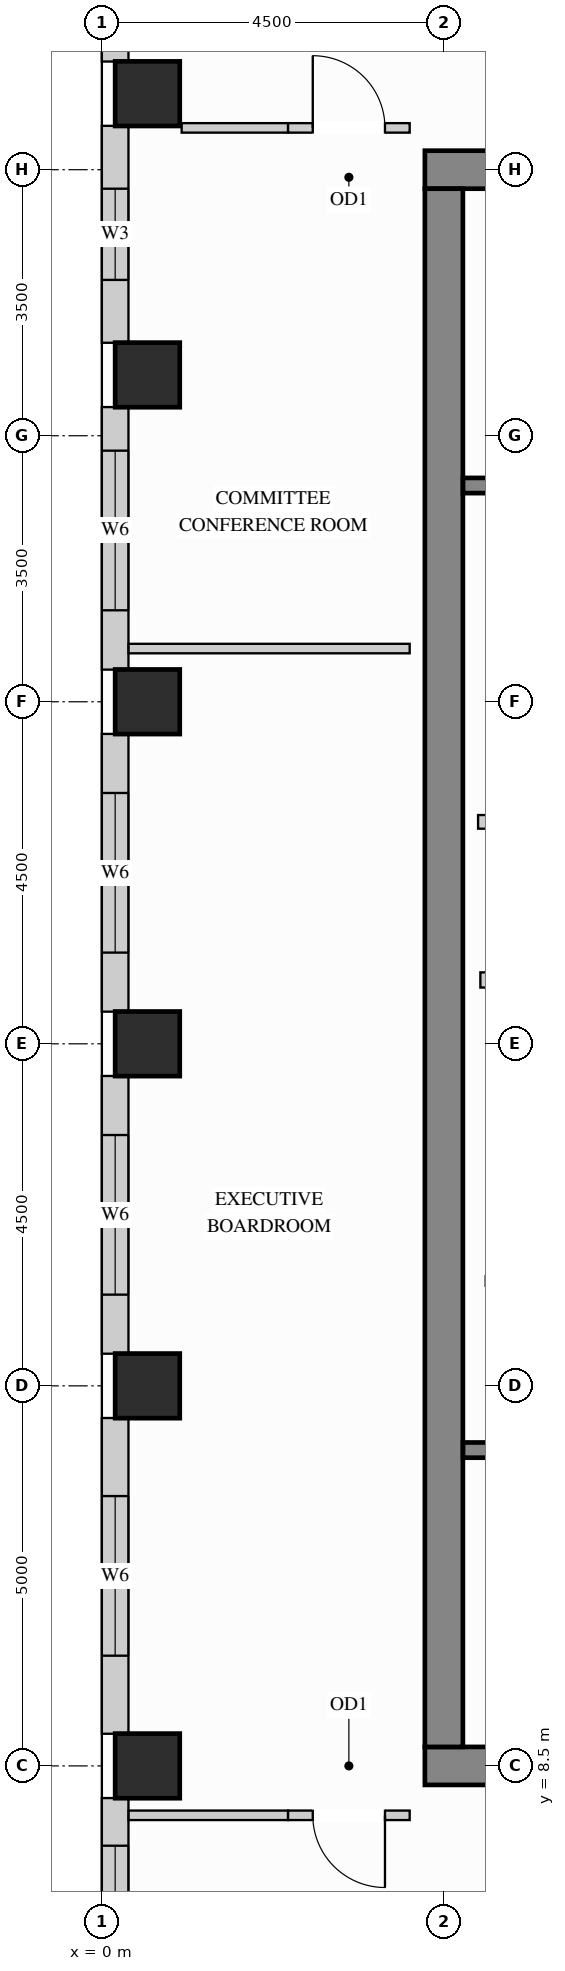
"""IFC4 building model, lengths in metres.
Left out: names, types, materials, properties, quantities, classifications, styles, units other than length and angle.
Written with IfcOpenShell. Run it as: python <this file> out.ifc"""

import sys

from ifc_helpers import new_model, si_unit, direction, frame, frame_2d, origin, origin_2d, place, context, subcontext, project, spatial, rectangle, extrude, source, transform, mapped, element, fill, save


model = new_model("IFC4")
c1 = context("Model", 3, precision=1e-05, world=origin(), true_north=direction((0.0, 1.0)))
c2 = subcontext(c1, "Body", "Model", "MODEL_VIEW")
j1 = project(units=[si_unit("LENGTHUNIT", "METRE"), si_unit("PLANEANGLEUNIT", "RADIAN")], contexts=[c1])
p1 = place(None, origin())
s1 = spatial("IfcSite", under=j1, at=p1, CompositionType="ELEMENT")
p2 = place(p1, origin())
s2 = spatial("IfcBuilding", under=s1, at=p2, CompositionType="ELEMENT")
p3 = place(p2, frame((0.0, 0.0, 244.8)))
s3 = spatial("IfcBuildingStorey", under=s2, at=p3, CompositionType="ELEMENT", Elevation=244.8)
m1 = source(origin(), c2, "Body", "SweptSolid", [
    extrude(rectangle(XDim=0.85, YDim=0.85, at=origin_2d()), origin(), (0.0, 0.0, 1.0), 3.4),
])
for number, where, z_axis, x_axis in (
    (1, (0.6, 13.5, 0.0), (0.0, 0.0, 1.0), (1.0, 0.0, 0.0)),
    (2, (0.6, 18.0, 0.0), (0.0, 0.0, 1.0), (1.0, 0.0, 0.0)),
    (3, (0.6, 22.5, 0.0), (0.0, 0.0, 1.0), (1.0, 0.0, 0.0)),
    (4, (0.6, 26.8, 0.0), (0.0, 0.0, 1.0), (1.0, 0.0, 0.0)),
    (5, (0.6, 30.5, 0.0), (0.0, 0.0, 1.0), (1.0, 0.0, 0.0)),
    (6, (0.6, 8.5, 0.0), (0.0, 0.0, 1.0), (1.0, 0.0, 0.0)),
):
    element("IfcColumn", number, at=place(p3, frame(where, z_axis=z_axis, x_axis=x_axis)), inside=s3, PredefinedType="COLUMN", context=c2, shape_type="MappedRepresentation", body=[
        mapped(m1, transform((0.0, 0.0, 0.0), x_axis=(1.0, 0.0, 0.0), y_axis=(0.0, 1.0, 0.0), z_axis=(0.0, 0.0, 1.0))),
    ])
m2 = source(origin(), c2, "Body", "SweptSolid", [
    extrude(rectangle(XDim=10.5, YDim=0.5, at=frame_2d((5.25, 0.0))), origin(), (0.0, 0.0, 1.0), 3.4),
])
for number, where, z_axis, x_axis in (
    (7, (4.25, 29.5, 0.0), (0.0, 0.0, 1.0), (1.0, 0.0, 0.0)),
    (8, (4.25, 8.5, 0.0), (0.0, 0.0, 1.0), (1.0, 0.0, 0.0)),
):
    element("IfcWall", number, at=place(p3, frame(where, z_axis=z_axis, x_axis=x_axis)), inside=s3, PredefinedType="SHEAR", context=c2, shape_type="MappedRepresentation", body=[
        mapped(m2, transform((0.0, 0.0, 0.0), x_axis=(1.0, 0.0, 0.0), y_axis=(0.0, 1.0, 0.0), z_axis=(0.0, 0.0, 1.0))),
    ])
m3 = source(origin(), c2, "Body", "SweptSolid", [
    extrude(rectangle(XDim=20.5, YDim=0.5, at=frame_2d((10.25, 0.0))), origin(), (0.0, 0.0, 1.0), 3.4),
])
p4 = place(p3, frame((4.5, 8.75, 0.0), z_axis=(0.0, 0.0, 1.0), x_axis=(0.0, 1.0, 0.0)))
e9 = element("IfcWall", 9, at=p4, inside=s3, PredefinedType="SHEAR", context=c2, shape_type="MappedRepresentation", body=[
    mapped(m3, transform((0.0, 0.0, 0.0), x_axis=(1.0, 0.0, 0.0), y_axis=(0.0, 1.0, 0.0), z_axis=(0.0, 0.0, 1.0))),
])
m4 = source(origin(), c2, "Body", "SweptSolid", [
    extrude(rectangle(XDim=0.527, YDim=0.35, at=frame_2d((0.263, 0.0))), origin(), (0.0, 0.0, 1.0), 3.385),
])
p5 = place(p3, frame((0.175, 31.45, 0.0), z_axis=(0.0, 0.0, 1.0), x_axis=(0.0, -1.0, 0.0)))
e10 = element("IfcWall", 10, at=p5, inside=s3, PredefinedType="SOLIDWALL", context=c2, shape_type="MappedRepresentation", body=[
    mapped(m4, transform((0.0, 0.0, 0.0), x_axis=(1.0, 0.0, 0.0), y_axis=(0.0, 1.0, 0.0), z_axis=(0.0, 0.0, 1.0))),
])
p6 = place(p3, frame((0.175, 30.077, 0.0), z_axis=(0.0, 0.0, 1.0), x_axis=(0.0, -1.0, 0.0)))
e11 = element("IfcWall", 11, at=p6, inside=s3, PredefinedType="SOLIDWALL", context=c2, shape_type="SweptSolid", body=[
    extrude(rectangle(XDim=2.854, YDim=0.35, at=frame_2d((1.427, 0.0))), origin(), (0.0, 0.0, 1.0), 3.385),
])
p7 = place(p6, frame((0.827, 0.0, 0.78)))
e12 = element("IfcOpeningElement", 12, at=p7, cuts=e11, PredefinedType="OPENING", context=c2, shape_type="SweptSolid", body=[
    extrude(rectangle(XDim=1.2, YDim=2.25, at=frame_2d((0.6, 1.125))), frame((0.0, 0.185, 0.0), z_axis=(0.0, -1.0, 0.0), x_axis=(1.0, 0.0, 0.0)), (0.0, 0.0, 1.0), 0.37),
])
p8 = place(p3, frame((0.175, 26.377, 0.0), z_axis=(0.0, 0.0, 1.0), x_axis=(0.0, -1.0, 0.0)))
e13 = element("IfcWall", 13, at=p8, inside=s3, PredefinedType="SOLIDWALL", context=c2, shape_type="SweptSolid", body=[
    extrude(rectangle(XDim=3.454, YDim=0.35, at=frame_2d((1.727, 0.0))), origin(), (0.0, 0.0, 1.0), 3.385),
])
p9 = place(p8, frame((0.573, 0.0, 0.78)))
e14 = element("IfcOpeningElement", 14, at=p9, cuts=e13, PredefinedType="OPENING", context=c2, shape_type="SweptSolid", body=[
    extrude(rectangle(XDim=2.1, YDim=2.25, at=frame_2d((1.05, 1.125))), frame((0.0, 0.185, 0.0), z_axis=(0.0, -1.0, 0.0), x_axis=(1.0, 0.0, 0.0)), (0.0, 0.0, 1.0), 0.37),
])
p10 = place(p3, frame((0.175, 22.077, 0.0), z_axis=(0.0, 0.0, 1.0), x_axis=(0.0, -1.0, 0.0)))
e15 = element("IfcWall", 15, at=p10, inside=s3, PredefinedType="SOLIDWALL", context=c2, shape_type="SweptSolid", body=[
    extrude(rectangle(XDim=3.654, YDim=0.35, at=frame_2d((1.827, 0.0))), origin(), (0.0, 0.0, 1.0), 3.385),
])
p11 = place(p10, frame((0.777, 0.0, 0.78)))
e16 = element("IfcOpeningElement", 16, at=p11, cuts=e15, PredefinedType="OPENING", context=c2, shape_type="SweptSolid", body=[
    extrude(rectangle(XDim=2.1, YDim=2.25, at=frame_2d((1.05, 1.125))), frame((0.0, 0.185, 0.0), z_axis=(0.0, -1.0, 0.0), x_axis=(1.0, 0.0, 0.0)), (0.0, 0.0, 1.0), 0.37),
])
p12 = place(p3, frame((0.175, 17.577, 0.0), z_axis=(0.0, 0.0, 1.0), x_axis=(0.0, -1.0, 0.0)))
e17 = element("IfcWall", 17, at=p12, inside=s3, PredefinedType="SOLIDWALL", context=c2, shape_type="SweptSolid", body=[
    extrude(rectangle(XDim=3.654, YDim=0.35, at=frame_2d((1.827, 0.0))), origin(), (0.0, 0.0, 1.0), 3.385),
])
p13 = place(p12, frame((0.777, 0.0, 0.78)))
e18 = element("IfcOpeningElement", 18, at=p13, cuts=e17, PredefinedType="OPENING", context=c2, shape_type="SweptSolid", body=[
    extrude(rectangle(XDim=2.1, YDim=2.25, at=frame_2d((1.05, 1.125))), frame((0.0, 0.185, 0.0), z_axis=(0.0, -1.0, 0.0), x_axis=(1.0, 0.0, 0.0)), (0.0, 0.0, 1.0), 0.37),
])
p14 = place(p3, frame((0.175, 13.077, 0.0), z_axis=(0.0, 0.0, 1.0), x_axis=(0.0, -1.0, 0.0)))
e19 = element("IfcWall", 19, at=p14, inside=s3, PredefinedType="SOLIDWALL", context=c2, shape_type="SweptSolid", body=[
    extrude(rectangle(XDim=4.154, YDim=0.35, at=frame_2d((2.077, 0.0))), origin(), (0.0, 0.0, 1.0), 3.385),
])
p15 = place(p14, frame((1.027, 0.0, 0.78)))
e20 = element("IfcOpeningElement", 20, at=p15, cuts=e19, PredefinedType="OPENING", context=c2, shape_type="SweptSolid", body=[
    extrude(rectangle(XDim=2.1, YDim=2.25, at=frame_2d((1.05, 1.125))), frame((0.0, 0.185, 0.0), z_axis=(0.0, -1.0, 0.0), x_axis=(1.0, 0.0, 0.0)), (0.0, 0.0, 1.0), 0.37),
])
p16 = place(p3, frame((0.175, 8.077, 0.0), z_axis=(0.0, 0.0, 1.0), x_axis=(0.0, -1.0, 0.0)))
e21 = element("IfcWall", 21, at=p16, inside=s3, PredefinedType="SOLIDWALL", context=c2, shape_type="SweptSolid", body=[
    extrude(rectangle(XDim=4.154, YDim=0.35, at=frame_2d((2.077, 0.0))), origin(), (0.0, 0.0, 1.0), 3.385),
])
p17 = place(p16, frame((0.627, 0.0, 0.78)))
e22 = element("IfcOpeningElement", 22, at=p17, cuts=e21, PredefinedType="OPENING", context=c2, shape_type="SweptSolid", body=[
    extrude(rectangle(XDim=2.1, YDim=2.25, at=frame_2d((1.05, 1.125))), frame((0.0, 0.185, 0.0), z_axis=(0.0, -1.0, 0.0), x_axis=(1.0, 0.0, 0.0)), (0.0, 0.0, 1.0), 0.37),
])
m5 = source(origin(), c2, "Body", "SweptSolid", [
    extrude(rectangle(XDim=2.2, YDim=0.18, at=frame_2d((1.1, 0.0))), origin(), (0.0, 0.0, 1.0), 3.385),
])
p18 = place(p3, frame((4.95, 20.92, 0.0), z_axis=(0.0, 0.0, 1.0), x_axis=(1.0, 0.0, 0.0)))
e23 = element("IfcWall", 23, at=p18, inside=s3, PredefinedType="PARTITIONING", context=c2, shape_type="MappedRepresentation", body=[
    mapped(m5, transform((0.0, 0.0, 0.0), x_axis=(1.0, 0.0, 0.0), y_axis=(0.0, 1.0, 0.0), z_axis=(0.0, 0.0, 1.0))),
])
p19 = place(p3, frame((5.05, 14.88, 0.0), z_axis=(0.0, 0.0, 1.0), x_axis=(1.0, 0.0, 0.0)))
e24 = element("IfcWall", 24, at=p19, inside=s3, PredefinedType="PARTITIONING", context=c2, shape_type="SweptSolid", body=[
    extrude(rectangle(XDim=2.35, YDim=0.125, at=frame_2d((1.175, 0.0))), origin(), (0.0, 0.0, 1.0), 3.385),
])
p20 = place(p19, frame((0.7, 0.0, 0.0)))
e25 = element("IfcOpeningElement", 25, at=p20, cuts=e24, PredefinedType="OPENING", context=c2, shape_type="SweptSolid", body=[
    extrude(rectangle(XDim=0.85, YDim=2.1, at=frame_2d((0.425, 1.05))), frame((0.0, 0.073, 0.0), z_axis=(0.0, -1.0, 0.0), x_axis=(1.0, 0.0, 0.0)), (0.0, 0.0, 1.0), 0.145),
])
m6 = source(origin(), c2, "Body", "SweptSolid", [
    extrude(rectangle(XDim=1.4, YDim=0.125, at=frame_2d((0.7, 0.0))), origin(), (0.0, 0.0, 1.0), 3.385),
])
p21 = place(p3, frame((1.05, 30.05, 0.0), z_axis=(0.0, 0.0, 1.0), x_axis=(1.0, 0.0, 0.0)))
e26 = element("IfcWall", 26, at=p21, inside=s3, PredefinedType="PARTITIONING", context=c2, shape_type="MappedRepresentation", body=[
    mapped(m6, transform((0.0, 0.0, 0.0), x_axis=(1.0, 0.0, 0.0), y_axis=(0.0, 1.0, 0.0), z_axis=(0.0, 0.0, 1.0))),
])
p22 = place(p3, frame((2.45, 30.05, 0.0), z_axis=(0.0, 0.0, 1.0), x_axis=(1.0, 0.0, 0.0)))
e27 = element("IfcWall", 27, at=p22, inside=s3, PredefinedType="PARTITIONING", context=c2, shape_type="SweptSolid", body=[
    extrude(rectangle(XDim=1.6, YDim=0.125, at=frame_2d((0.8, 0.0))), origin(), (0.0, 0.0, 1.0), 3.385),
])
p23 = place(p22, frame((0.325, 0.0, 0.0)))
e28 = element("IfcOpeningElement", 28, at=p23, cuts=e27, PredefinedType="OPENING", context=c2, shape_type="SweptSolid", body=[
    extrude(rectangle(XDim=0.95, YDim=2.15, at=frame_2d((0.475, 1.075))), frame((0.0, 0.073, 0.0), z_axis=(0.0, -1.0, 0.0), x_axis=(1.0, 0.0, 0.0)), (0.0, 0.0, 1.0), 0.145),
])
m7 = source(origin(), c2, "Body", "SweptSolid", [
    extrude(rectangle(XDim=2.098, YDim=0.125, at=frame_2d((1.049, 0.0))), origin(), (0.0, 0.0, 1.0), 3.385),
])
p24 = place(p3, frame((0.352, 7.85, 0.0), z_axis=(0.0, 0.0, 1.0), x_axis=(1.0, 0.0, 0.0)))
e29 = element("IfcWall", 29, at=p24, inside=s3, PredefinedType="PARTITIONING", context=c2, shape_type="MappedRepresentation", body=[
    mapped(m7, transform((0.0, 0.0, 0.0), x_axis=(1.0, 0.0, 0.0), y_axis=(0.0, 1.0, 0.0), z_axis=(0.0, 0.0, 1.0))),
])
p25 = place(p3, frame((2.45, 7.85, 0.0), z_axis=(0.0, 0.0, 1.0), x_axis=(1.0, 0.0, 0.0)))
e30 = element("IfcWall", 30, at=p25, inside=s3, PredefinedType="PARTITIONING", context=c2, shape_type="SweptSolid", body=[
    extrude(rectangle(XDim=1.6, YDim=0.125, at=frame_2d((0.8, 0.0))), origin(), (0.0, 0.0, 1.0), 3.385),
])
p26 = place(p25, frame((0.325, 0.0, 0.0)))
e31 = element("IfcOpeningElement", 31, at=p26, cuts=e30, PredefinedType="OPENING", context=c2, shape_type="SweptSolid", body=[
    extrude(rectangle(XDim=0.95, YDim=2.15, at=frame_2d((0.475, 1.075))), frame((0.0, 0.073, 0.0), z_axis=(0.0, -1.0, 0.0), x_axis=(1.0, 0.0, 0.0)), (0.0, 0.0, 1.0), 0.145),
])
m8 = source(origin(), c2, "Body", "SweptSolid", [
    extrude(rectangle(XDim=3.698, YDim=0.125, at=frame_2d((1.849, 0.0))), origin(), (0.0, 0.0, 1.0), 3.385),
])
p27 = place(p3, frame((0.352, 23.2, 0.0), z_axis=(0.0, 0.0, 1.0), x_axis=(1.0, 0.0, 0.0)))
e32 = element("IfcWall", 32, at=p27, inside=s3, PredefinedType="PARTITIONING", context=c2, shape_type="MappedRepresentation", body=[
    mapped(m8, transform((0.0, 0.0, 0.0), x_axis=(1.0, 0.0, 0.0), y_axis=(0.0, 1.0, 0.0), z_axis=(0.0, 0.0, 1.0))),
])
m9 = source(origin(), c2, "Body", "SweptSolid", [
    extrude(rectangle(XDim=2.09, YDim=0.2, at=frame_2d((1.045, 0.0))), origin(), (0.0, 0.0, 1.0), 3.385),
])
p28 = place(p3, frame((4.98, 18.84, 0.0), z_axis=(0.0, 0.0, 1.0), x_axis=(1.0, 0.0, 0.0)))
e33 = element("IfcWall", 33, at=p28, inside=s3, PredefinedType="PARTITIONING", context=c2, shape_type="MappedRepresentation", body=[
    mapped(m9, transform((0.0, 0.0, 0.0), x_axis=(1.0, 0.0, 0.0), y_axis=(0.0, 1.0, 0.0), z_axis=(0.0, 0.0, 1.0))),
])
p29 = place(p3, frame((4.752, 12.655, 0.0), z_axis=(0.0, 0.0, 1.0), x_axis=(1.0, 0.0, 0.0)))
e34 = element("IfcWall", 34, at=p29, inside=s3, PredefinedType="SHEAR", context=c2, shape_type="SweptSolid", body=[
    extrude(rectangle(XDim=7.653, YDim=0.2, at=frame_2d((3.827, 0.0))), origin(), (0.0, 0.0, 1.0), 3.4),
])
p30 = place(p29, frame((0.4, 0.0, 0.0)))
e35 = element("IfcOpeningElement", 35, at=p30, cuts=e34, PredefinedType="OPENING", context=c2, shape_type="SweptSolid", body=[
    extrude(rectangle(XDim=1.1, YDim=2.15, at=frame_2d((0.55, 1.075))), frame((0.0, 0.11, 0.0), z_axis=(0.0, -1.0, 0.0), x_axis=(1.0, 0.0, 0.0)), (0.0, 0.0, 1.0), 0.22),
])
p31 = place(p3, frame((4.752, 25.345, 0.0), z_axis=(0.0, 0.0, 1.0), x_axis=(1.0, 0.0, 0.0)))
e36 = element("IfcWall", 36, at=p31, inside=s3, PredefinedType="SHEAR", context=c2, shape_type="SweptSolid", body=[
    extrude(rectangle(XDim=7.653, YDim=0.2, at=frame_2d((3.827, 0.0))), origin(), (0.0, 0.0, 1.0), 3.4),
])
p32 = place(p31, frame((0.4, 0.0, 0.0)))
e37 = element("IfcOpeningElement", 37, at=p32, cuts=e36, PredefinedType="OPENING", context=c2, shape_type="SweptSolid", body=[
    extrude(rectangle(XDim=1.1, YDim=2.15, at=frame_2d((0.55, 1.075))), frame((0.0, 0.11, 0.0), z_axis=(0.0, -1.0, 0.0), x_axis=(1.0, 0.0, 0.0)), (0.0, 0.0, 1.0), 0.22),
])
m10 = source(origin(), c2, "Body", "SweptSolid", [
    extrude(rectangle(XDim=0.95, YDim=2.15, at=frame_2d((0.475, 1.075))), frame((0.0, 0.025, 0.0), z_axis=(0.0, -1.0, 0.0), x_axis=(1.0, 0.0, 0.0)), (0.0, 0.0, 1.0), 0.05),
])
p33 = place(p26, origin())
e38 = element("IfcDoor", 38, at=p33, inside=s3, OperationType="SINGLE_SWING_RIGHT", PredefinedType="DOOR", context=c2, shape_type="MappedRepresentation", body=[
    mapped(m10, transform((0.0, 0.0, 0.0), x_axis=(1.0, 0.0, 0.0), y_axis=(0.0, 1.0, 0.0), z_axis=(0.0, 0.0, 1.0))),
])
fill(e31, e38)
p34 = place(p23, origin())
e39 = element("IfcDoor", 39, at=p34, inside=s3, OperationType="SINGLE_SWING_LEFT", PredefinedType="DOOR", context=c2, shape_type="MappedRepresentation", body=[
    mapped(m10, transform((0.0, 0.0, 0.0), x_axis=(1.0, 0.0, 0.0), y_axis=(0.0, 1.0, 0.0), z_axis=(0.0, 0.0, 1.0))),
])
fill(e28, e39)
m11 = source(origin(), c2, "Body", "SweptSolid", [
    extrude(rectangle(XDim=1.2, YDim=2.25, at=frame_2d((0.6, 1.125))), frame((0.0, 0.03, 0.0), z_axis=(0.0, -1.0, 0.0), x_axis=(1.0, 0.0, 0.0)), (0.0, 0.0, 1.0), 0.06),
])
p35 = place(p7, origin())
e40 = element("IfcWindow", 40, at=p35, inside=s3, PartitioningType="SINGLE_PANEL", PredefinedType="WINDOW", context=c2, shape_type="MappedRepresentation", body=[
    mapped(m11, transform((0.0, 0.0, 0.0), x_axis=(1.0, 0.0, 0.0), y_axis=(0.0, 1.0, 0.0), z_axis=(0.0, 0.0, 1.0))),
])
fill(e12, e40)
m12 = source(origin(), c2, "Body", "SweptSolid", [
    extrude(rectangle(XDim=2.1, YDim=2.25, at=frame_2d((1.05, 1.125))), frame((0.0, 0.03, 0.0), z_axis=(0.0, -1.0, 0.0), x_axis=(1.0, 0.0, 0.0)), (0.0, 0.0, 1.0), 0.06),
])
p36 = place(p9, origin())
e41 = element("IfcWindow", 41, at=p36, inside=s3, PartitioningType="SINGLE_PANEL", PredefinedType="WINDOW", context=c2, shape_type="MappedRepresentation", body=[
    mapped(m12, transform((0.0, 0.0, 0.0), x_axis=(1.0, 0.0, 0.0), y_axis=(0.0, 1.0, 0.0), z_axis=(0.0, 0.0, 1.0))),
])
fill(e14, e41)
p37 = place(p11, origin())
e42 = element("IfcWindow", 42, at=p37, inside=s3, PartitioningType="SINGLE_PANEL", PredefinedType="WINDOW", context=c2, shape_type="MappedRepresentation", body=[
    mapped(m12, transform((0.0, 0.0, 0.0), x_axis=(1.0, 0.0, 0.0), y_axis=(0.0, 1.0, 0.0), z_axis=(0.0, 0.0, 1.0))),
])
fill(e16, e42)
p38 = place(p13, origin())
e43 = element("IfcWindow", 43, at=p38, inside=s3, PartitioningType="SINGLE_PANEL", PredefinedType="WINDOW", context=c2, shape_type="MappedRepresentation", body=[
    mapped(m12, transform((0.0, 0.0, 0.0), x_axis=(1.0, 0.0, 0.0), y_axis=(0.0, 1.0, 0.0), z_axis=(0.0, 0.0, 1.0))),
])
fill(e18, e43)
p39 = place(p15, origin())
e44 = element("IfcWindow", 44, at=p39, inside=s3, PartitioningType="SINGLE_PANEL", PredefinedType="WINDOW", context=c2, shape_type="MappedRepresentation", body=[
    mapped(m12, transform((0.0, 0.0, 0.0), x_axis=(1.0, 0.0, 0.0), y_axis=(0.0, 1.0, 0.0), z_axis=(0.0, 0.0, 1.0))),
])
fill(e20, e44)
p40 = place(p17, origin())
e45 = element("IfcWindow", 45, at=p40, inside=s3, PartitioningType="SINGLE_PANEL", PredefinedType="WINDOW", context=c2, shape_type="MappedRepresentation", body=[
    mapped(m12, transform((0.0, 0.0, 0.0), x_axis=(1.0, 0.0, 0.0), y_axis=(0.0, 1.0, 0.0), z_axis=(0.0, 0.0, 1.0))),
])
fill(e22, e45)
save(model, sys.argv[1])
